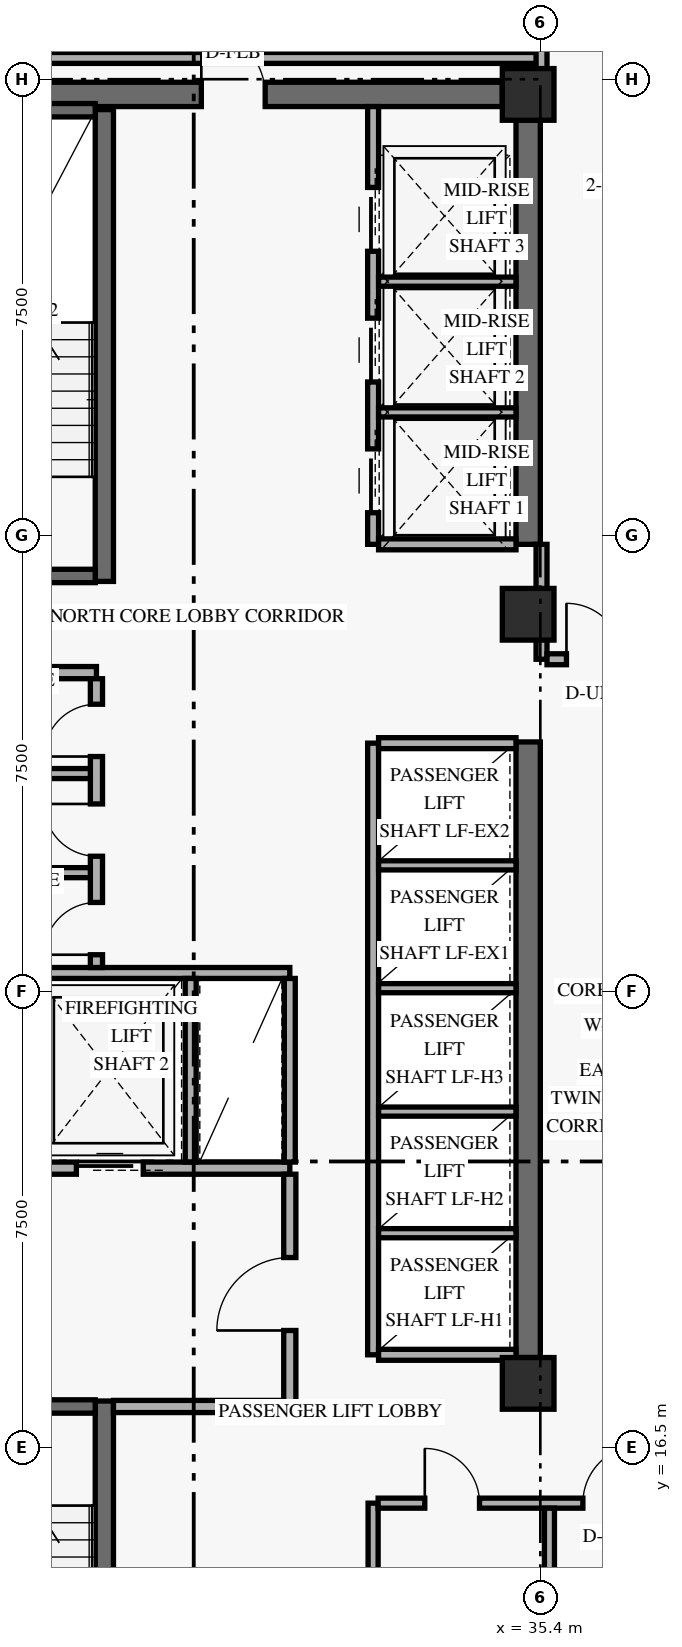
"""IFC4 building model, lengths in metres.
Left out: names, types, materials, properties, quantities, classifications, styles, units other than length and angle.
Written with IfcOpenShell. Run it as: python <this file> out.ifc"""

import sys

from ifc_helpers import new_model, si_unit, direction, frame, frame_2d, origin, origin_2d, place, context, subcontext, project, spatial, rectangle, extrude, element, fill, save


model = new_model("IFC4")
c1 = context("Model", 3, precision=1e-05, world=origin(), true_north=direction((0.0, 1.0)))
c2 = subcontext(c1, "Body", "Model", "MODEL_VIEW")
j1 = project(units=[si_unit("LENGTHUNIT", "METRE"), si_unit("PLANEANGLEUNIT", "RADIAN")], contexts=[c1])
p1 = place(None, origin())
s1 = spatial("IfcSite", under=j1, at=p1, CompositionType="ELEMENT")
p2 = place(p1, origin())
s2 = spatial("IfcBuilding", under=s1, at=p2, CompositionType="ELEMENT")
p3 = place(p2, frame((0.0, 0.0, 124.8)))
s3 = spatial("IfcBuildingStorey", under=s2, at=p3, CompositionType="ELEMENT", Elevation=124.8)
p4 = place(p3, frame((35.2, 17.975, 0.0), z_axis=(0.0, 0.0, 1.0), x_axis=(0.0, 1.0, 0.0)))
e1 = element("IfcWall", 1, at=p4, inside=s3, PredefinedType="SHEAR", context=c2, shape_type="SweptSolid", body=[
    extrude(rectangle(XDim=10.125, YDim=0.4, at=frame_2d((5.062, 0.0))), origin(), (0.0, 0.0, 1.0), 2.749),
])
p5 = place(p3, frame((35.2, 31.35, 0.0), z_axis=(0.0, 0.0, 1.0), x_axis=(0.0, 1.0, 0.0)))
e2 = element("IfcWall", 2, at=p5, inside=s3, PredefinedType="SHEAR", context=c2, shape_type="SweptSolid", body=[
    extrude(rectangle(XDim=6.975, YDim=0.4, at=frame_2d((3.487, 0.0))), origin(), (0.0, 0.0, 1.0), 2.749),
])
p6 = place(p3, frame((24.625, 38.75, 0.0), z_axis=(0.0, 0.0, 1.0), x_axis=(1.0, 0.0, 0.0)))
e3 = element("IfcWall", 3, at=p6, inside=s3, PredefinedType="SHEAR", context=c2, shape_type="SweptSolid", body=[
    extrude(rectangle(XDim=10.15, YDim=0.4, at=frame_2d((5.075, 0.0))), origin(), (0.0, 0.0, 1.0), 3.36),
])
p7 = place(p6, frame((5.2, 0.0, 0.0)))
e4 = element("IfcOpeningElement", 4, at=p7, cuts=e3, PredefinedType="OPENING", context=c2, shape_type="SweptSolid", body=[
    extrude(rectangle(XDim=1.05, YDim=2.15, at=frame_2d((0.525, 1.075))), frame((0.0, 0.21, 0.0), z_axis=(0.0, -1.0, 0.0), x_axis=(1.0, 0.0, 0.0)), (0.0, 0.0, 1.0), 0.42),
])
p8 = place(p3, frame((28.23, 9.5, 0.0), z_axis=(0.0, 0.0, 1.0), x_axis=(0.0, 1.0, 0.0)))
e5 = element("IfcWall", 5, at=p8, inside=s3, PredefinedType="SHEAR", context=c2, shape_type="SweptSolid", body=[
    extrude(rectangle(XDim=7.76, YDim=0.3, at=frame_2d((3.88, 0.0))), origin(), (0.0, 0.0, 1.0), 3.36),
])
p9 = place(p3, frame((24.92, 17.17, 0.0), z_axis=(0.0, 0.0, 1.0), x_axis=(1.0, 0.0, 0.0)))
e6 = element("IfcWall", 6, at=p9, inside=s3, PredefinedType="SHEAR", context=c2, shape_type="SweptSolid", body=[
    extrude(rectangle(XDim=3.16, YDim=0.22, at=frame_2d((1.58, 0.0))), origin(), (0.0, 0.0, 1.0), 3.36),
])
p10 = place(p9, frame((0.78, 0.0, 0.0)))
e7 = element("IfcOpeningElement", 7, at=p10, cuts=e6, PredefinedType="OPENING", context=c2, shape_type="SweptSolid", body=[
    extrude(rectangle(XDim=1.05, YDim=2.15, at=frame_2d((0.525, 1.075))), frame((0.0, 0.12, 0.0), z_axis=(0.0, -1.0, 0.0), x_axis=(1.0, 0.0, 0.0)), (0.0, 0.0, 1.0), 0.24),
])
p11 = place(p3, frame((28.23, 30.74, 0.0), z_axis=(0.0, 0.0, 1.0), x_axis=(0.0, 1.0, 0.0)))
e8 = element("IfcWall", 8, at=p11, inside=s3, PredefinedType="SHEAR", context=c2, shape_type="SweptSolid", body=[
    extrude(rectangle(XDim=7.76, YDim=0.3, at=frame_2d((3.88, 0.0))), origin(), (0.0, 0.0, 1.0), 3.36),
])
p12 = place(p3, frame((24.92, 30.83, 0.0), z_axis=(0.0, 0.0, 1.0), x_axis=(1.0, 0.0, 0.0)))
e9 = element("IfcWall", 9, at=p12, inside=s3, PredefinedType="SHEAR", context=c2, shape_type="SweptSolid", body=[
    extrude(rectangle(XDim=3.16, YDim=0.22, at=frame_2d((1.58, 0.0))), origin(), (0.0, 0.0, 1.0), 3.36),
])
p13 = place(p12, frame((0.78, 0.0, 0.0)))
e10 = element("IfcOpeningElement", 10, at=p13, cuts=e9, PredefinedType="OPENING", context=c2, shape_type="SweptSolid", body=[
    extrude(rectangle(XDim=1.05, YDim=2.15, at=frame_2d((0.525, 1.075))), frame((0.0, 0.12, 0.0), z_axis=(0.0, -1.0, 0.0), x_axis=(1.0, 0.0, 0.0)), (0.0, 0.0, 1.0), 0.24),
])
p14 = place(p3, frame((24.92, 38.49, 0.0), z_axis=(0.0, 0.0, 1.0), x_axis=(1.0, 0.0, 0.0)))
e11 = element("IfcWall", 11, at=p14, inside=s3, PredefinedType="SHEAR", context=c2, shape_type="SweptSolid", body=[
    extrude(rectangle(XDim=3.16, YDim=0.22, at=frame_2d((1.58, 0.0))), origin(), (0.0, 0.0, 1.0), 3.36),
])
for number, where, z_axis, x_axis in (
    (12, (35.2, 17.55, 0.0), (0.0, 0.0, 1.0), (1.0, 0.0, 0.0)),
    (13, (35.2, 30.2, 0.0), (0.0, 0.0, 1.0), (1.0, 0.0, 0.0)),
    (14, (35.2, 38.75, 0.0), (0.0, 0.0, 1.0), (1.0, 0.0, 0.0)),
):
    element("IfcColumn", number, at=place(p3, frame(where, z_axis=z_axis, x_axis=x_axis)), inside=s3, PredefinedType="COLUMN", context=c2, shape_type="SweptSolid", body=[
        extrude(rectangle(XDim=0.85, YDim=0.85, at=origin_2d()), origin(), (0.0, 0.0, 1.0), 3.6),
    ])
p15 = place(p3, frame((24.45, 21.09, 0.0), z_axis=(0.0, 0.0, 1.0), x_axis=(1.0, 0.0, 0.0)))
e15 = element("IfcWall", 15, at=p15, inside=s3, PredefinedType="STANDARD", context=c2, shape_type="SweptSolid", body=[
    extrude(rectangle(XDim=6.83, YDim=0.2, at=frame_2d((3.415, 0.0))), origin(), (0.0, 0.0, 1.0), 3.36),
])
p16 = place(p15, frame((0.72, 0.0, 0.0)))
e16 = element("IfcOpeningElement", 16, at=p16, cuts=e15, PredefinedType="OPENING", context=c2, shape_type="SweptSolid", body=[
    extrude(rectangle(XDim=1.1, YDim=2.2, at=frame_2d((0.55, 1.1))), frame((0.0, 0.11, 0.0), z_axis=(0.0, -1.0, 0.0), x_axis=(1.0, 0.0, 0.0)), (0.0, 0.0, 1.0), 0.22),
])
p17 = place(p15, frame((3.32, 0.0, 0.0)))
e17 = element("IfcOpeningElement", 17, at=p17, cuts=e15, PredefinedType="OPENING", context=c2, shape_type="SweptSolid", body=[
    extrude(rectangle(XDim=1.1, YDim=2.2, at=frame_2d((0.55, 1.1))), frame((0.0, 0.11, 0.0), z_axis=(0.0, -1.0, 0.0), x_axis=(1.0, 0.0, 0.0)), (0.0, 0.0, 1.0), 0.22),
])
p18 = place(p3, frame((28.38, 17.17, 0.0), z_axis=(0.0, 0.0, 1.0), x_axis=(1.0, 0.0, 0.0)))
e18 = element("IfcWall", 18, at=p18, inside=s3, PredefinedType="STANDARD", context=c2, shape_type="SweptSolid", body=[
    extrude(rectangle(XDim=2.9, YDim=0.2, at=frame_2d((1.45, 0.0))), origin(), (0.0, 0.0, 1.0), 3.36),
])
p19 = place(p3, frame((31.28, 17.07, 0.0), z_axis=(0.0, 0.0, 1.0), x_axis=(0.0, 1.0, 0.0)))
e19 = element("IfcWall", 19, at=p19, inside=s3, PredefinedType="STANDARD", context=c2, shape_type="SweptSolid", body=[
    extrude(rectangle(XDim=3.92, YDim=0.2, at=frame_2d((1.96, 0.0))), origin(), (0.0, 0.0, 1.0), 2.731),
])
p20 = place(p19, frame((1.35, 0.0, 0.0)))
e20 = element("IfcOpeningElement", 20, at=p20, cuts=e19, PredefinedType="OPENING", context=c2, shape_type="SweptSolid", body=[
    extrude(rectangle(XDim=1.2, YDim=2.15, at=frame_2d((0.6, 1.075))), frame((0.0, 0.11, 0.0), z_axis=(0.0, -1.0, 0.0), x_axis=(1.0, 0.0, 0.0)), (0.0, 0.0, 1.0), 0.22),
])
p21 = place(p3, frame((24.45, 24.3, 0.0), z_axis=(0.0, 0.0, 1.0), x_axis=(1.0, 0.0, 0.0)))
e21 = element("IfcWall", 21, at=p21, inside=s3, PredefinedType="STANDARD", context=c2, shape_type="SweptSolid", body=[
    extrude(rectangle(XDim=6.83, YDim=0.18, at=frame_2d((3.415, 0.0))), origin(), (0.0, 0.0, 1.0), 3.36),
])
for number, where, z_axis, x_axis in (
    (22, (29.65, 21.19, 0.0), (0.0, 0.0, 1.0), (0.0, 1.0, 0.0)),
    (23, (31.28, 21.19, 0.0), (0.0, 0.0, 1.0), (0.0, 1.0, 0.0)),
):
    element("IfcWall", number, at=place(p3, frame(where, z_axis=z_axis, x_axis=x_axis)), inside=s3, PredefinedType="STANDARD", context=c2, shape_type="SweptSolid", body=[
        extrude(rectangle(XDim=3.02, YDim=0.18, at=frame_2d((1.51, 0.0))), origin(), (0.0, 0.0, 1.0), 3.36),
    ])
p22 = place(p3, frame((24.45, 29.24, 0.0), z_axis=(0.0, 0.0, 1.0), x_axis=(1.0, 0.0, 0.0)))
e24 = element("IfcWall", 24, at=p22, inside=s3, PredefinedType="STANDARD", context=c2, shape_type="SweptSolid", body=[
    extrude(rectangle(XDim=3.65, YDim=0.2, at=frame_2d((1.825, 0.0))), origin(), (0.0, 0.0, 1.0), 3.36),
])
p23 = place(p3, frame((28.1, 24.39, 0.0), z_axis=(0.0, 0.0, 1.0), x_axis=(0.0, 1.0, 0.0)))
e25 = element("IfcWall", 25, at=p23, inside=s3, PredefinedType="STANDARD", context=c2, shape_type="SweptSolid", body=[
    extrude(rectangle(XDim=4.75, YDim=0.2, at=frame_2d((2.375, 0.0))), origin(), (0.0, 0.0, 1.0), 3.36),
])
p24 = place(p23, frame((0.21, 0.0, 0.0)))
e26 = element("IfcOpeningElement", 26, at=p24, cuts=e25, PredefinedType="OPENING", context=c2, shape_type="SweptSolid", body=[
    extrude(rectangle(XDim=0.86, YDim=2.1, at=frame_2d((0.43, 1.05))), frame((0.0, 0.11, 0.0), z_axis=(0.0, -1.0, 0.0), x_axis=(1.0, 0.0, 0.0)), (0.0, 0.0, 1.0), 0.22),
])
p25 = place(p23, frame((1.83, 0.0, 0.0)))
e27 = element("IfcOpeningElement", 27, at=p25, cuts=e25, PredefinedType="OPENING", context=c2, shape_type="SweptSolid", body=[
    extrude(rectangle(XDim=0.86, YDim=2.1, at=frame_2d((0.43, 1.05))), frame((0.0, 0.11, 0.0), z_axis=(0.0, -1.0, 0.0), x_axis=(1.0, 0.0, 0.0)), (0.0, 0.0, 1.0), 0.22),
])
p26 = place(p23, frame((3.47, 0.0, 0.0)))
e28 = element("IfcOpeningElement", 28, at=p26, cuts=e25, PredefinedType="OPENING", context=c2, shape_type="SweptSolid", body=[
    extrude(rectangle(XDim=0.86, YDim=2.1, at=frame_2d((0.43, 1.05))), frame((0.0, 0.11, 0.0), z_axis=(0.0, -1.0, 0.0), x_axis=(1.0, 0.0, 0.0)), (0.0, 0.0, 1.0), 0.22),
])
for number, where, z_axis, x_axis in (
    (29, (24.45, 25.95, 0.0), (0.0, 0.0, 1.0), (1.0, 0.0, 0.0)),
    (30, (24.45, 27.58, 0.0), (0.0, 0.0, 1.0), (1.0, 0.0, 0.0)),
):
    element("IfcWall", number, at=place(p3, frame(where, z_axis=z_axis, x_axis=x_axis)), inside=s3, PredefinedType="PARTITIONING", context=c2, shape_type="SweptSolid", body=[
        extrude(rectangle(XDim=3.55, YDim=0.165, at=frame_2d((1.775, 0.0))), origin(), (0.0, 0.0, 1.0), 3.36),
    ])
p27 = place(p3, frame((32.65, 18.02, 0.0), z_axis=(0.0, 0.0, 1.0), x_axis=(0.0, 1.0, 0.0)))
e31 = element("IfcWall", 31, at=p27, inside=s3, PredefinedType="STANDARD", context=c2, shape_type="SweptSolid", body=[
    extrude(rectangle(XDim=10.06, YDim=0.18, at=frame_2d((5.03, 0.0))), origin(), (0.0, 0.0, 1.0), 3.36),
])
for number, where, z_axis, x_axis in (
    (32, (32.74, 18.02, 0.0), (0.0, 0.0, 1.0), (1.0, 0.0, 0.0)),
    (33, (32.74, 28.08, 0.0), (0.0, 0.0, 1.0), (1.0, 0.0, 0.0)),
):
    element("IfcWall", number, at=place(p3, frame(where, z_axis=z_axis, x_axis=x_axis)), inside=s3, PredefinedType="STANDARD", context=c2, shape_type="SweptSolid", body=[
        extrude(rectangle(XDim=2.26, YDim=0.18, at=frame_2d((1.13, 0.0))), origin(), (0.0, 0.0, 1.0), 3.36),
    ])
for number, where, z_axis, x_axis in (
    (34, (32.74, 20.02, 0.0), (0.0, 0.0, 1.0), (1.0, 0.0, 0.0)),
    (35, (32.74, 22.02, 0.0), (0.0, 0.0, 1.0), (1.0, 0.0, 0.0)),
    (36, (32.74, 24.05, 0.0), (0.0, 0.0, 1.0), (1.0, 0.0, 0.0)),
    (37, (32.74, 26.07, 0.0), (0.0, 0.0, 1.0), (1.0, 0.0, 0.0)),
):
    element("IfcWall", number, at=place(p3, frame(where, z_axis=z_axis, x_axis=x_axis)), inside=s3, PredefinedType="STANDARD", context=c2, shape_type="SweptSolid", body=[
        extrude(rectangle(XDim=2.26, YDim=0.15, at=frame_2d((1.13, 0.0))), origin(), (0.0, 0.0, 1.0), 3.36),
    ])
p28 = place(p3, frame((32.65, 31.35, 0.0), z_axis=(0.0, 0.0, 1.0), x_axis=(0.0, 1.0, 0.0)))
e38 = element("IfcWall", 38, at=p28, inside=s3, PredefinedType="STANDARD", context=c2, shape_type="SweptSolid", body=[
    extrude(rectangle(XDim=7.2, YDim=0.18, at=frame_2d((3.6, 0.0))), origin(), (0.0, 0.0, 1.0), 3.36),
])
p29 = place(p28, frame((0.52, 0.0, 0.0)))
e39 = element("IfcOpeningElement", 39, at=p29, cuts=e38, PredefinedType="OPENING", context=c2, shape_type="SweptSolid", body=[
    extrude(rectangle(XDim=1.05, YDim=2.2, at=frame_2d((0.525, 1.1))), frame((0.0, 0.1, 0.0), z_axis=(0.0, -1.0, 0.0), x_axis=(1.0, 0.0, 0.0)), (0.0, 0.0, 1.0), 0.2),
])
p30 = place(p28, frame((2.67, 0.0, 0.0)))
e40 = element("IfcOpeningElement", 40, at=p30, cuts=e38, PredefinedType="OPENING", context=c2, shape_type="SweptSolid", body=[
    extrude(rectangle(XDim=1.05, YDim=2.2, at=frame_2d((0.525, 1.1))), frame((0.0, 0.1, 0.0), z_axis=(0.0, -1.0, 0.0), x_axis=(1.0, 0.0, 0.0)), (0.0, 0.0, 1.0), 0.2),
])
p31 = place(p28, frame((4.82, 0.0, 0.0)))
e41 = element("IfcOpeningElement", 41, at=p31, cuts=e38, PredefinedType="OPENING", context=c2, shape_type="SweptSolid", body=[
    extrude(rectangle(XDim=1.05, YDim=2.2, at=frame_2d((0.525, 1.1))), frame((0.0, 0.1, 0.0), z_axis=(0.0, -1.0, 0.0), x_axis=(1.0, 0.0, 0.0)), (0.0, 0.0, 1.0), 0.2),
])
p32 = place(p3, frame((32.74, 31.35, 0.0), z_axis=(0.0, 0.0, 1.0), x_axis=(1.0, 0.0, 0.0)))
e42 = element("IfcWall", 42, at=p32, inside=s3, PredefinedType="STANDARD", context=c2, shape_type="SweptSolid", body=[
    extrude(rectangle(XDim=2.26, YDim=0.18, at=frame_2d((1.13, 0.0))), origin(), (0.0, 0.0, 1.0), 3.36),
])
for number, where, z_axis, x_axis in (
    (43, (32.74, 33.52, 0.0), (0.0, 0.0, 1.0), (1.0, 0.0, 0.0)),
    (44, (32.74, 35.67, 0.0), (0.0, 0.0, 1.0), (1.0, 0.0, 0.0)),
):
    element("IfcWall", number, at=place(p3, frame(where, z_axis=z_axis, x_axis=x_axis)), inside=s3, PredefinedType="STANDARD", context=c2, shape_type="SweptSolid", body=[
        extrude(rectangle(XDim=2.26, YDim=0.15, at=frame_2d((1.13, 0.0))), origin(), (0.0, 0.0, 1.0), 3.36),
    ])
p33 = place(p3, frame((32.65, 9.5, 0.0), z_axis=(0.0, 0.0, 1.0), x_axis=(0.0, 1.0, 0.0)))
e45 = element("IfcWall", 45, at=p33, inside=s3, PredefinedType="PARTITIONING", context=c2, shape_type="SweptSolid", body=[
    extrude(rectangle(XDim=6.08, YDim=0.165, at=frame_2d((3.04, 0.0))), origin(), (0.0, 0.0, 1.0), 3.36),
])
p34 = place(p3, frame((32.732, 15.58, 0.0), z_axis=(0.0, 0.0, 1.0), x_axis=(1.0, 0.0, 0.0)))
e46 = element("IfcWall", 46, at=p34, inside=s3, PredefinedType="PARTITIONING", context=c2, shape_type="SweptSolid", body=[
    extrude(rectangle(XDim=5.618, YDim=0.165, at=frame_2d((2.809, 0.0))), origin(), (0.0, 0.0, 1.0), 2.731),
])
p35 = place(p34, frame((0.768, 0.0, 0.0)))
e47 = element("IfcOpeningElement", 47, at=p35, cuts=e46, PredefinedType="OPENING", context=c2, shape_type="SweptSolid", body=[
    extrude(rectangle(XDim=0.9, YDim=2.1, at=frame_2d((0.45, 1.05))), frame((0.0, 0.093, 0.0), z_axis=(0.0, -1.0, 0.0), x_axis=(1.0, 0.0, 0.0)), (0.0, 0.0, 1.0), 0.185),
])
p36 = place(p34, frame((3.367, 0.0, 0.0)))
e48 = element("IfcOpeningElement", 48, at=p36, cuts=e46, PredefinedType="OPENING", context=c2, shape_type="SweptSolid", body=[
    extrude(rectangle(XDim=0.95, YDim=2.15, at=frame_2d((0.475, 1.075))), frame((0.0, 0.093, 0.0), z_axis=(0.0, -1.0, 0.0), x_axis=(1.0, 0.0, 0.0)), (0.0, 0.0, 1.0), 0.185),
])
p37 = place(p3, frame((35.55, 9.5, 0.0), z_axis=(0.0, 0.0, 1.0), x_axis=(0.0, 1.0, 0.0)))
e49 = element("IfcWall", 49, at=p37, inside=s3, PredefinedType="PARTITIONING", context=c2, shape_type="SweptSolid", body=[
    extrude(rectangle(XDim=5.998, YDim=0.165, at=frame_2d((2.999, 0.0))), origin(), (0.0, 0.0, 1.0), 2.988),
])
p38 = place(p3, frame((35.42, 29.46, 0.0), z_axis=(0.0, 0.0, 1.0), x_axis=(0.0, 1.0, 0.0)))
e50 = element("IfcWall", 50, at=p38, inside=s3, PredefinedType="STANDARD", context=c2, shape_type="SweptSolid", body=[
    extrude(rectangle(XDim=1.89, YDim=0.18, at=frame_2d((0.945, 0.0))), origin(), (0.0, 0.0, 1.0), 2.731),
])
p39 = place(p3, frame((35.51, 29.46, 0.0), z_axis=(0.0, 0.0, 1.0), x_axis=(1.0, 0.0, 0.0)))
e51 = element("IfcWall", 51, at=p39, inside=s3, PredefinedType="STANDARD", context=c2, shape_type="SweptSolid", body=[
    extrude(rectangle(XDim=11.49, YDim=0.18, at=frame_2d((5.745, 0.0))), origin(), (0.0, 0.0, 1.0), 2.731),
])
p40 = place(p39, frame((0.32, 0.0, 0.0)))
e52 = element("IfcOpeningElement", 52, at=p40, cuts=e51, PredefinedType="OPENING", context=c2, shape_type="SweptSolid", body=[
    extrude(rectangle(XDim=0.92, YDim=2.15, at=frame_2d((0.46, 1.075))), frame((0.0, 0.1, 0.0), z_axis=(0.0, -1.0, 0.0), x_axis=(1.0, 0.0, 0.0)), (0.0, 0.0, 1.0), 0.2),
])
p41 = place(p3, frame((23.85, 39.35, 0.0), z_axis=(0.0, 0.0, 1.0), x_axis=(1.0, 0.0, 0.0)))
e53 = element("IfcWall", 53, at=p41, inside=s3, PredefinedType="STANDARD", context=c2, shape_type="SweptSolid", body=[
    extrude(rectangle(XDim=11.57, YDim=0.18, at=frame_2d((5.785, 0.0))), origin(), (0.0, 0.0, 1.0), 2.731),
])
p42 = place(p3, frame((35.42, 38.75, 0.0), z_axis=(0.0, 0.0, 1.0), x_axis=(0.0, 1.0, 0.0)))
e54 = element("IfcWall", 54, at=p42, inside=s3, PredefinedType="PARTITIONING", context=c2, shape_type="SweptSolid", body=[
    extrude(rectangle(XDim=6.27, YDim=0.18, at=frame_2d((3.135, 0.0))), origin(), (0.0, 0.0, 1.0), 2.731),
])
p43 = place(p17, origin())
e55 = element("IfcDoor", 55, at=p43, inside=s3, OperationType="SLIDING_TO_LEFT", PredefinedType="DOOR", context=c2, shape_type="SweptSolid", body=[
    extrude(rectangle(XDim=1.1, YDim=2.2, at=frame_2d((0.55, 1.1))), frame((0.0, 0.025, 0.0), z_axis=(0.0, -1.0, 0.0), x_axis=(1.0, 0.0, 0.0)), (0.0, 0.0, 1.0), 0.05),
])
fill(e17, e55)
p44 = place(p20, origin())
e56 = element("IfcDoor", 56, at=p44, inside=s3, OperationType="SINGLE_SWING_LEFT", PredefinedType="DOOR", context=c2, shape_type="SweptSolid", body=[
    extrude(rectangle(XDim=1.2, YDim=2.15, at=frame_2d((0.6, 1.075))), frame((0.0, 0.025, 0.0), z_axis=(0.0, -1.0, 0.0), x_axis=(1.0, 0.0, 0.0)), (0.0, 0.0, 1.0), 0.05),
])
fill(e20, e56)
p45 = place(p24, origin())
e57 = element("IfcDoor", 57, at=p45, inside=s3, OperationType="SINGLE_SWING_LEFT", PredefinedType="DOOR", context=c2, shape_type="SweptSolid", body=[
    extrude(rectangle(XDim=0.86, YDim=2.1, at=frame_2d((0.43, 1.05))), frame((0.0, 0.025, 0.0), z_axis=(0.0, -1.0, 0.0), x_axis=(1.0, 0.0, 0.0)), (0.0, 0.0, 1.0), 0.05),
])
fill(e26, e57)
p46 = place(p25, origin())
e58 = element("IfcDoor", 58, at=p46, inside=s3, OperationType="SINGLE_SWING_RIGHT", PredefinedType="DOOR", context=c2, shape_type="SweptSolid", body=[
    extrude(rectangle(XDim=0.86, YDim=2.1, at=frame_2d((0.43, 1.05))), frame((0.0, 0.025, 0.0), z_axis=(0.0, -1.0, 0.0), x_axis=(1.0, 0.0, 0.0)), (0.0, 0.0, 1.0), 0.05),
])
fill(e27, e58)
p47 = place(p26, origin())
e59 = element("IfcDoor", 59, at=p47, inside=s3, OperationType="SINGLE_SWING_LEFT", PredefinedType="DOOR", context=c2, shape_type="SweptSolid", body=[
    extrude(rectangle(XDim=0.86, YDim=2.1, at=frame_2d((0.43, 1.05))), frame((0.0, 0.025, 0.0), z_axis=(0.0, -1.0, 0.0), x_axis=(1.0, 0.0, 0.0)), (0.0, 0.0, 1.0), 0.05),
])
fill(e28, e59)
p48 = place(p29, origin())
e60 = element("IfcDoor", 60, at=p48, inside=s3, OperationType="SLIDING_TO_LEFT", PredefinedType="DOOR", context=c2, shape_type="SweptSolid", body=[
    extrude(rectangle(XDim=1.05, YDim=2.2, at=frame_2d((0.525, 1.1))), frame((0.0, 0.025, 0.0), z_axis=(0.0, -1.0, 0.0), x_axis=(1.0, 0.0, 0.0)), (0.0, 0.0, 1.0), 0.05),
])
fill(e39, e60)
p49 = place(p30, origin())
e61 = element("IfcDoor", 61, at=p49, inside=s3, OperationType="SLIDING_TO_LEFT", PredefinedType="DOOR", context=c2, shape_type="SweptSolid", body=[
    extrude(rectangle(XDim=1.05, YDim=2.2, at=frame_2d((0.525, 1.1))), frame((0.0, 0.025, 0.0), z_axis=(0.0, -1.0, 0.0), x_axis=(1.0, 0.0, 0.0)), (0.0, 0.0, 1.0), 0.05),
])
fill(e40, e61)
p50 = place(p31, origin())
e62 = element("IfcDoor", 62, at=p50, inside=s3, OperationType="SLIDING_TO_LEFT", PredefinedType="DOOR", context=c2, shape_type="SweptSolid", body=[
    extrude(rectangle(XDim=1.05, YDim=2.2, at=frame_2d((0.525, 1.1))), frame((0.0, 0.025, 0.0), z_axis=(0.0, -1.0, 0.0), x_axis=(1.0, 0.0, 0.0)), (0.0, 0.0, 1.0), 0.05),
])
fill(e41, e62)
p51 = place(p35, origin())
e63 = element("IfcDoor", 63, at=p51, inside=s3, OperationType="SINGLE_SWING_LEFT", PredefinedType="DOOR", context=c2, shape_type="SweptSolid", body=[
    extrude(rectangle(XDim=0.9, YDim=2.1, at=frame_2d((0.45, 1.05))), frame((0.0, 0.025, 0.0), z_axis=(0.0, -1.0, 0.0), x_axis=(1.0, 0.0, 0.0)), (0.0, 0.0, 1.0), 0.05),
])
fill(e47, e63)
p52 = place(p36, origin())
e64 = element("IfcDoor", 64, at=p52, inside=s3, OperationType="SINGLE_SWING_RIGHT", PredefinedType="DOOR", context=c2, shape_type="SweptSolid", body=[
    extrude(rectangle(XDim=0.95, YDim=2.15, at=frame_2d((0.475, 1.075))), frame((0.0, 0.025, 0.0), z_axis=(0.0, -1.0, 0.0), x_axis=(1.0, 0.0, 0.0)), (0.0, 0.0, 1.0), 0.05),
])
fill(e48, e64)
p53 = place(p7, frame((1.05, 0.0, 0.0), z_axis=(0.0, 0.0, 1.0), x_axis=(-1.0, 0.0, 0.0)))
e65 = element("IfcDoor", 65, at=p53, inside=s3, OperationType="SINGLE_SWING_RIGHT", PredefinedType="DOOR", context=c2, shape_type="SweptSolid", body=[
    extrude(rectangle(XDim=1.05, YDim=2.15, at=frame_2d((0.525, 1.075))), frame((0.0, 0.025, 0.0), z_axis=(0.0, -1.0, 0.0), x_axis=(1.0, 0.0, 0.0)), (0.0, 0.0, 1.0), 0.05),
])
fill(e4, e65)
p54 = place(p40, origin())
e66 = element("IfcDoor", 66, at=p54, inside=s3, OperationType="SINGLE_SWING_LEFT", PredefinedType="DOOR", context=c2, shape_type="SweptSolid", body=[
    extrude(rectangle(XDim=0.92, YDim=2.15, at=frame_2d((0.46, 1.075))), frame((0.0, 0.025, 0.0), z_axis=(0.0, -1.0, 0.0), x_axis=(1.0, 0.0, 0.0)), (0.0, 0.0, 1.0), 0.05),
])
fill(e52, e66)
save(model, sys.argv[1])
